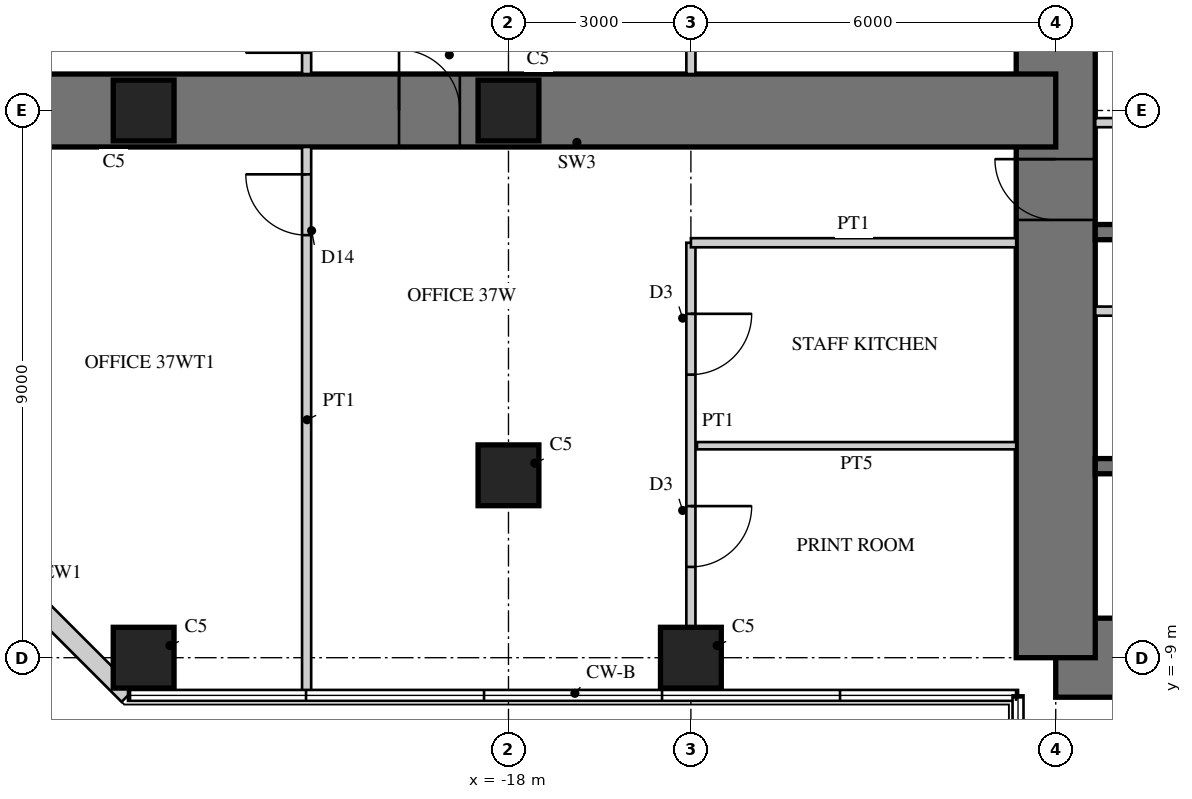
"""IFC4 building model, lengths in metres.
Left out: names, types, materials, properties, quantities, classifications, styles, units other than length and angle.
Written with IfcOpenShell. Run it as: python <this file> out.ifc"""

import sys

from ifc_helpers import new_model, si_unit, direction, frame, frame_2d, origin, origin_2d, place, context, subcontext, project, spatial, rectangle, extrude, element, fill, save


model = new_model("IFC4")
c1 = context("Model", 3, precision=1e-05, world=origin(), true_north=direction((0.0, 1.0)))
c2 = subcontext(c1, "Body", "Model", "MODEL_VIEW")
j1 = project(units=[si_unit("LENGTHUNIT", "METRE"), si_unit("PLANEANGLEUNIT", "RADIAN")], contexts=[c1])
p1 = place(None, origin())
s1 = spatial("IfcSite", under=j1, at=p1, CompositionType="ELEMENT")
p2 = place(p1, origin())
s2 = spatial("IfcBuilding", under=s1, at=p2, CompositionType="ELEMENT")
p3 = place(p2, frame((0.0, 0.0, 152.5)))
s3 = spatial("IfcBuildingStorey", under=s2, at=p3, CompositionType="ELEMENT", Elevation=152.5)
p4 = place(p3, frame((-9.0, -9.0, 0.0), z_axis=(0.0, 0.0, 1.0), x_axis=(1.0, 0.0, 0.0)))
e1 = element("IfcWall", 1, at=p4, inside=s3, PredefinedType="SHEAR", context=c2, shape_type="SweptSolid", body=[
    extrude(rectangle(XDim=18.0, YDim=1.3, at=frame_2d((9.0, 0.0))), origin(), (0.0, 0.0, 1.0), 4.0),
])
p5 = place(p4, frame((9.8, 0.0, 0.0)))
e2 = element("IfcOpeningElement", 2, at=p5, cuts=e1, PredefinedType="OPENING", context=c2, shape_type="SweptSolid", body=[
    extrude(rectangle(XDim=1.0, YDim=2.4, at=frame_2d((0.5, 1.2))), frame((0.0, 0.66, 0.0), z_axis=(0.0, -1.0, 0.0), x_axis=(1.0, 0.0, 0.0)), (0.0, 0.0, 1.0), 1.32),
])
p6 = place(p3, frame((-9.0, 9.0, 0.0), z_axis=(0.0, 0.0, 1.0), x_axis=(0.0, -1.0, 0.0)))
e3 = element("IfcWall", 3, at=p6, inside=s3, PredefinedType="SHEAR", context=c2, shape_type="SweptSolid", body=[
    extrude(rectangle(XDim=18.0, YDim=1.3, at=frame_2d((9.0, 0.0))), origin(), (0.0, 0.0, 1.0), 4.0),
])
p7 = place(p6, frame((9.8, 0.0, 0.0)))
e4 = element("IfcOpeningElement", 4, at=p7, cuts=e3, PredefinedType="OPENING", context=c2, shape_type="SweptSolid", body=[
    extrude(rectangle(XDim=1.0, YDim=2.4, at=frame_2d((0.5, 1.2))), frame((0.0, 0.66, 0.0), z_axis=(0.0, -1.0, 0.0), x_axis=(1.0, 0.0, 0.0)), (0.0, 0.0, 1.0), 1.32),
])
for number, where, z_axis, x_axis in (
    (5, (-1.925, -2.0, 0.0), (0.0, 0.0, 1.0), (-1.0, 0.0, 0.0)),
    (6, (-1.925, -5.85, 0.0), (0.0, 0.0, 1.0), (-1.0, 0.0, 0.0)),
):
    element("IfcWall", number, at=place(p3, frame(where, z_axis=z_axis, x_axis=x_axis)), inside=s3, PredefinedType="SHEAR", context=c2, shape_type="SweptSolid", body=[
        extrude(rectangle(XDim=6.425, YDim=0.25, at=frame_2d((3.212, 0.0))), origin(), (0.0, 0.0, 1.0), 4.0),
    ])
p8 = place(p3, frame((-1.925, -3.3, 0.0), z_axis=(0.0, 0.0, 1.0), x_axis=(-1.0, 0.0, 0.0)))
e7 = element("IfcWall", 7, at=p8, inside=s3, PredefinedType="PARTITIONING", context=c2, shape_type="SweptSolid", body=[
    extrude(rectangle(XDim=6.425, YDim=0.15, at=frame_2d((3.212, 0.0))), origin(), (0.0, 0.0, 1.0), 4.0),
])
p9 = place(p8, frame((0.075, 0.0, 0.0)))
e8 = element("IfcOpeningElement", 8, at=p9, cuts=e7, PredefinedType="OPENING", context=c2, shape_type="SweptSolid", body=[
    extrude(rectangle(XDim=0.8, YDim=2.1, at=frame_2d((0.4, 1.05))), frame((0.0, 0.085, 0.0), z_axis=(0.0, -1.0, 0.0), x_axis=(1.0, 0.0, 0.0)), (0.0, 0.0, 1.0), 0.17),
])
p10 = place(p8, frame((3.675, 0.0, 0.0)))
e9 = element("IfcOpeningElement", 9, at=p10, cuts=e7, PredefinedType="OPENING", context=c2, shape_type="SweptSolid", body=[
    extrude(rectangle(XDim=0.8, YDim=2.1, at=frame_2d((0.4, 1.05))), frame((0.0, 0.085, 0.0), z_axis=(0.0, -1.0, 0.0), x_axis=(1.0, 0.0, 0.0)), (0.0, 0.0, 1.0), 0.17),
])
p11 = place(p3, frame((-9.0, 0.0, 0.0), z_axis=(0.0, 0.0, 1.0), x_axis=(-1.0, 0.0, 0.0)))
e10 = element("IfcWall", 10, at=p11, inside=s3, PredefinedType="SHEAR", context=c2, shape_type="SweptSolid", body=[
    extrude(rectangle(XDim=18.0, YDim=1.2, at=frame_2d((9.0, 0.0))), origin(), (0.0, 0.0, 1.0), 4.0),
])
p12 = place(p11, frame((9.8, 0.0, 0.0)))
e11 = element("IfcOpeningElement", 11, at=p12, cuts=e10, PredefinedType="OPENING", context=c2, shape_type="SweptSolid", body=[
    extrude(rectangle(XDim=1.0, YDim=2.2, at=frame_2d((0.5, 1.1))), frame((0.0, 0.61, 0.0), z_axis=(0.0, -1.0, 0.0), x_axis=(1.0, 0.0, 0.0)), (0.0, 0.0, 1.0), 1.22),
])
for number, where, z_axis, x_axis in (
    (12, (-15.0, -9.0, 0.0), (0.0, 0.0, 1.0), (1.0, 0.0, 0.0)),
    (13, (-24.0, -9.0, 0.0), (0.0, 0.0, 1.0), (1.0, 0.0, 0.0)),
    (14, (-18.0, 0.0, 0.0), (0.0, 0.0, 1.0), (1.0, 0.0, 0.0)),
    (15, (-18.0, -6.0, 0.0), (0.0, 0.0, 1.0), (1.0, 0.0, 0.0)),
    (16, (-24.0, 0.0, 0.0), (0.0, 0.0, 1.0), (1.0, 0.0, 0.0)),
):
    element("IfcColumn", number, at=place(p3, frame(where, z_axis=z_axis, x_axis=x_axis)), inside=s3, PredefinedType="COLUMN", context=c2, shape_type="SweptSolid", body=[
        extrude(rectangle(XDim=1.0, YDim=1.0, at=origin_2d()), origin(), (0.0, 0.0, 1.0), 4.0),
    ])
p13 = place(p3, frame((-27.6, -6.277, 0.0), z_axis=(0.0, 0.0, 1.0), x_axis=(0.707106781187, -0.707106781187, 0.0)))
e17 = element("IfcWall", 17, at=p13, inside=s3, PredefinedType="SOLIDWALL", context=c2, shape_type="SweptSolid", body=[
    extrude(rectangle(XDim=4.728, YDim=0.3, at=frame_2d((2.364, 0.0))), origin(), (0.0, 0.0, 1.0), 3.8),
])
p14 = place(p13, frame((1.914, 0.0, 0.3)))
e18 = element("IfcOpeningElement", 18, at=p14, cuts=e17, PredefinedType="OPENING", context=c2, shape_type="SweptSolid", body=[
    extrude(rectangle(XDim=0.9, YDim=2.4, at=frame_2d((0.45, 1.2))), frame((0.0, 0.16, 0.0), z_axis=(0.0, -1.0, 0.0), x_axis=(1.0, 0.0, 0.0)), (0.0, 0.0, 1.0), 0.32),
])
p15 = place(p3, frame((-2.325, -0.2, 0.0), z_axis=(0.0, 0.0, 1.0), x_axis=(-1.0, 0.0, 0.0)))
e19 = element("IfcWall", 19, at=p15, inside=s3, PredefinedType="PARTITIONING", context=c2, shape_type="SweptSolid", body=[
    extrude(rectangle(XDim=6.025, YDim=0.15, at=frame_2d((3.013, 0.0))), origin(), (0.0, 0.0, 1.0), 3.8),
])
p16 = place(p15, frame((0.4, 0.0, 0.0)))
e20 = element("IfcOpeningElement", 20, at=p16, cuts=e19, PredefinedType="OPENING", context=c2, shape_type="SweptSolid", body=[
    extrude(rectangle(XDim=1.0, YDim=2.1, at=frame_2d((0.5, 1.05))), frame((0.0, 0.085, 0.0), z_axis=(0.0, -1.0, 0.0), x_axis=(1.0, 0.0, 0.0)), (0.0, 0.0, 1.0), 0.17),
])
p17 = place(p3, frame((-15.0, -2.175, 0.0), z_axis=(0.0, 0.0, 1.0), x_axis=(0.0, -1.0, 0.0)))
e21 = element("IfcWall", 21, at=p17, inside=s3, PredefinedType="PARTITIONING", context=c2, shape_type="SweptSolid", body=[
    extrude(rectangle(XDim=6.325, YDim=0.15, at=frame_2d((3.163, 0.0))), origin(), (0.0, 0.0, 1.0), 3.0),
])
p18 = place(p17, frame((1.169, 0.0, 0.0)))
e22 = element("IfcOpeningElement", 22, at=p18, cuts=e21, PredefinedType="OPENING", context=c2, shape_type="SweptSolid", body=[
    extrude(rectangle(XDim=1.0, YDim=2.1, at=frame_2d((0.5, 1.05))), frame((0.0, 0.085, 0.0), z_axis=(0.0, -1.0, 0.0), x_axis=(1.0, 0.0, 0.0)), (0.0, 0.0, 1.0), 0.17),
])
p19 = place(p17, frame((4.332, 0.0, 0.0)))
e23 = element("IfcOpeningElement", 23, at=p19, cuts=e21, PredefinedType="OPENING", context=c2, shape_type="SweptSolid", body=[
    extrude(rectangle(XDim=1.0, YDim=2.1, at=frame_2d((0.5, 1.05))), frame((0.0, 0.085, 0.0), z_axis=(0.0, -1.0, 0.0), x_axis=(1.0, 0.0, 0.0)), (0.0, 0.0, 1.0), 0.17),
])
p20 = place(p3, frame((-9.65, -2.175, 0.0), z_axis=(0.0, 0.0, 1.0), x_axis=(-1.0, 0.0, 0.0)))
e24 = element("IfcWall", 24, at=p20, inside=s3, PredefinedType="PARTITIONING", context=c2, shape_type="SweptSolid", body=[
    extrude(rectangle(XDim=5.35, YDim=0.15, at=frame_2d((2.675, 0.0))), origin(), (0.0, 0.0, 1.0), 3.8),
])
p21 = place(p3, frame((-9.65, -5.513, 0.0), z_axis=(0.0, 0.0, 1.0), x_axis=(-1.0, 0.0, 0.0)))
e25 = element("IfcWall", 25, at=p21, inside=s3, PredefinedType="PLUMBINGWALL", context=c2, shape_type="SweptSolid", body=[
    extrude(rectangle(XDim=5.25, YDim=0.12, at=frame_2d((2.625, 0.0))), origin(), (0.0, 0.0, 1.0), 3.8),
])
p22 = place(p3, frame((-15.0, 8.5, 0.0), z_axis=(0.0, 0.0, 1.0), x_axis=(0.0, -1.0, 0.0)))
e26 = element("IfcWall", 26, at=p22, inside=s3, PredefinedType="PARTITIONING", context=c2, shape_type="SweptSolid", body=[
    extrude(rectangle(XDim=7.9, YDim=0.15, at=frame_2d((3.95, 0.0))), origin(), (0.0, 0.0, 1.0), 3.0),
])
p23 = place(p22, frame((3.45, 0.0, 0.0)))
e27 = element("IfcOpeningElement", 27, at=p23, cuts=e26, PredefinedType="OPENING", context=c2, shape_type="SweptSolid", body=[
    extrude(rectangle(XDim=1.0, YDim=2.1, at=frame_2d((0.5, 1.05))), frame((0.0, 0.085, 0.0), z_axis=(0.0, -1.0, 0.0), x_axis=(1.0, 0.0, 0.0)), (0.0, 0.0, 1.0), 0.17),
])
p24 = place(p3, frame((-21.32, -0.6, 0.0), z_axis=(0.0, 0.0, 1.0), x_axis=(0.0, -1.0, 0.0)))
e28 = element("IfcWall", 28, at=p24, inside=s3, PredefinedType="PARTITIONING", context=c2, shape_type="SweptSolid", body=[
    extrude(rectangle(XDim=8.98, YDim=0.15, at=frame_2d((4.49, 0.0))), origin(), (0.0, 0.0, 1.0), 3.8),
])
p25 = place(p24, frame((0.45, 0.0, 0.0)))
e29 = element("IfcOpeningElement", 29, at=p25, cuts=e28, PredefinedType="OPENING", context=c2, shape_type="SweptSolid", body=[
    extrude(rectangle(XDim=1.0, YDim=2.2, at=frame_2d((0.5, 1.1))), frame((0.0, 0.085, 0.0), z_axis=(0.0, -1.0, 0.0), x_axis=(1.0, 0.0, 0.0)), (0.0, 0.0, 1.0), 0.17),
])
p26 = place(p3, frame((-21.32, 9.58, 0.0), z_axis=(0.0, 0.0, 1.0), x_axis=(0.0, -1.0, 0.0)))
e30 = element("IfcWall", 30, at=p26, inside=s3, PredefinedType="PARTITIONING", context=c2, shape_type="SweptSolid", body=[
    extrude(rectangle(XDim=8.98, YDim=0.15, at=frame_2d((4.49, 0.0))), origin(), (0.0, 0.0, 1.0), 3.8),
])
p27 = place(p26, frame((4.987, 0.0, 0.0)))
e31 = element("IfcOpeningElement", 31, at=p27, cuts=e30, PredefinedType="OPENING", context=c2, shape_type="SweptSolid", body=[
    extrude(rectangle(XDim=1.0, YDim=2.2, at=frame_2d((0.5, 1.1))), frame((0.0, 0.085, 0.0), z_axis=(0.0, -1.0, 0.0), x_axis=(1.0, 0.0, 0.0)), (0.0, 0.0, 1.0), 0.17),
])
p28 = place(p26, frame((7.63, 0.0, 0.0)))
e32 = element("IfcOpeningElement", 32, at=p28, cuts=e30, PredefinedType="OPENING", context=c2, shape_type="SweptSolid", body=[
    extrude(rectangle(XDim=1.0, YDim=2.2, at=frame_2d((0.5, 1.1))), frame((0.0, 0.085, 0.0), z_axis=(0.0, -1.0, 0.0), x_axis=(1.0, 0.0, 0.0)), (0.0, 0.0, 1.0), 0.17),
])
p29 = place(p18, origin())
e33 = element("IfcDoor", 33, at=p29, inside=s3, OperationType="SINGLE_SWING_LEFT", PredefinedType="DOOR", context=c2, shape_type="SweptSolid", body=[
    extrude(rectangle(XDim=1.0, YDim=2.1, at=frame_2d((0.5, 1.05))), frame((0.0, 0.025, 0.0), z_axis=(0.0, -1.0, 0.0), x_axis=(1.0, 0.0, 0.0)), (0.0, 0.0, 1.0), 0.05),
])
fill(e22, e33)
p30 = place(p19, origin())
e34 = element("IfcDoor", 34, at=p30, inside=s3, OperationType="SINGLE_SWING_LEFT", PredefinedType="DOOR", context=c2, shape_type="SweptSolid", body=[
    extrude(rectangle(XDim=1.0, YDim=2.1, at=frame_2d((0.5, 1.05))), frame((0.0, 0.025, 0.0), z_axis=(0.0, -1.0, 0.0), x_axis=(1.0, 0.0, 0.0)), (0.0, 0.0, 1.0), 0.05),
])
fill(e23, e34)
p31 = place(p25, frame((1.0, 0.0, 0.0), z_axis=(0.0, 0.0, 1.0), x_axis=(-1.0, 0.0, 0.0)))
e35 = element("IfcDoor", 35, at=p31, inside=s3, OperationType="SINGLE_SWING_RIGHT", PredefinedType="DOOR", context=c2, shape_type="SweptSolid", body=[
    extrude(rectangle(XDim=1.0, YDim=2.2, at=frame_2d((0.5, 1.1))), frame((0.0, 0.025, 0.0), z_axis=(0.0, -1.0, 0.0), x_axis=(1.0, 0.0, 0.0)), (0.0, 0.0, 1.0), 0.05),
])
fill(e29, e35)
p32 = place(p28, frame((1.0, 0.0, 0.0), z_axis=(0.0, 0.0, 1.0), x_axis=(-1.0, 0.0, 0.0)))
e36 = element("IfcDoor", 36, at=p32, inside=s3, OperationType="SINGLE_SWING_LEFT", PredefinedType="DOOR", context=c2, shape_type="SweptSolid", body=[
    extrude(rectangle(XDim=1.0, YDim=2.2, at=frame_2d((0.5, 1.1))), frame((0.0, 0.025, 0.0), z_axis=(0.0, -1.0, 0.0), x_axis=(1.0, 0.0, 0.0)), (0.0, 0.0, 1.0), 0.05),
])
fill(e32, e36)
p33 = place(p12, frame((1.0, 0.0, 0.0), z_axis=(0.0, 0.0, 1.0), x_axis=(-1.0, 0.0, 0.0)))
e37 = element("IfcDoor", 37, at=p33, inside=s3, OperationType="SINGLE_SWING_LEFT", PredefinedType="DOOR", context=c2, shape_type="SweptSolid", body=[
    extrude(rectangle(XDim=1.0, YDim=2.2, at=frame_2d((0.5, 1.1))), frame((0.0, 0.025, 0.0), z_axis=(0.0, -1.0, 0.0), x_axis=(1.0, 0.0, 0.0)), (0.0, 0.0, 1.0), 0.05),
])
fill(e11, e37)
p34 = place(p7, frame((1.0, 0.0, 0.0), z_axis=(0.0, 0.0, 1.0), x_axis=(-1.0, 0.0, 0.0)))
e38 = element("IfcDoor", 38, at=p34, inside=s3, OperationType="SINGLE_SWING_RIGHT", PredefinedType="DOOR", context=c2, shape_type="SweptSolid", body=[
    extrude(rectangle(XDim=1.0, YDim=2.4, at=frame_2d((0.5, 1.2))), frame((0.0, -0.005, 0.0), z_axis=(0.0, -1.0, 0.0), x_axis=(1.0, 0.0, 0.0)), (0.0, 0.0, 1.0), 0.05),
])
fill(e4, e38)
save(model, sys.argv[1])
